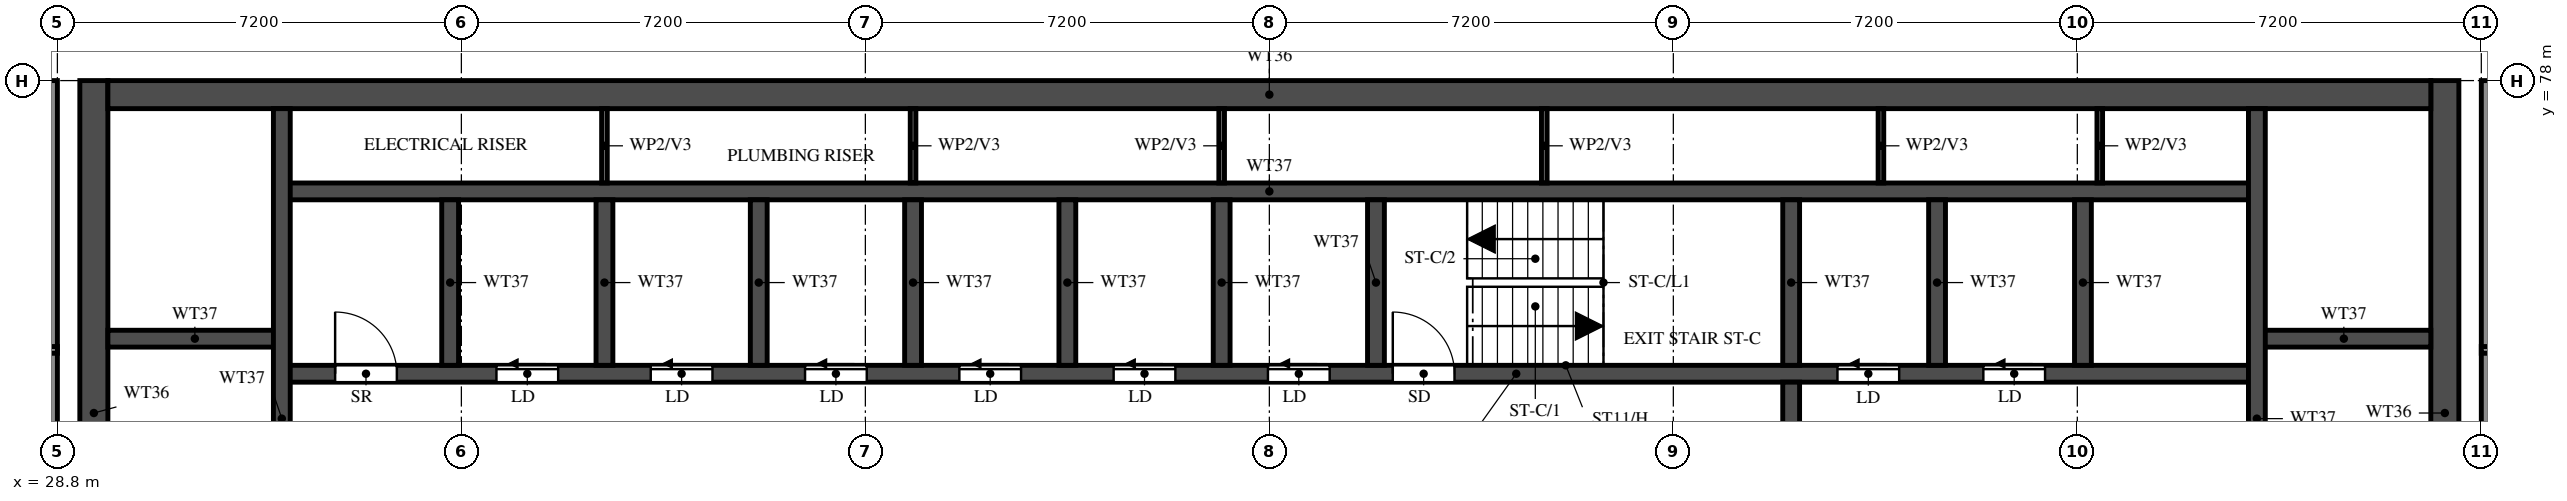
"""IFC4 building model, lengths in metres.
Left out: names, types, materials, properties, quantities, classifications, styles, units other than length and angle.
Written with IfcOpenShell. Run it as: python <this file> out.ifc"""

import sys

from ifc_helpers import new_model, si_unit, direction, frame, frame_2d, origin, place, context, subcontext, project, spatial, rectangle, extrude, element, fill, save


model = new_model("IFC4")
c1 = context("Model", 3, precision=1e-05, world=origin(), true_north=direction((0.0, 1.0)))
c2 = subcontext(c1, "Body", "Model", "MODEL_VIEW")
j1 = project(units=[si_unit("LENGTHUNIT", "METRE"), si_unit("PLANEANGLEUNIT", "RADIAN")], contexts=[c1])
p1 = place(None, origin())
s1 = spatial("IfcSite", under=j1, at=p1, CompositionType="ELEMENT")
p2 = place(p1, origin())
s2 = spatial("IfcBuilding", under=s1, at=p2, CompositionType="ELEMENT")
p3 = place(p2, frame((0.0, 0.0, 264.0)))
s3 = spatial("IfcBuildingStorey", under=s2, at=p3, CompositionType="ELEMENT", Elevation=264.0)
for number, where, z_axis, x_axis in (
    (1, (29.45, 66.15, 0.0), (0.0, 0.0, 1.0), (0.0, 1.0, 0.0)),
    (2, (71.35, 66.15, 0.0), (0.0, 0.0, 1.0), (0.0, 1.0, 0.0)),
):
    element("IfcWall", number, at=place(p3, frame(where, z_axis=z_axis, x_axis=x_axis)), inside=s3, PredefinedType="SHEAR", context=c2, shape_type="SweptSolid", body=[
        extrude(rectangle(XDim=11.85, YDim=0.5, at=frame_2d((5.925, 0.0))), origin(), (0.0, 0.0, 1.0), 3.22),
    ])
p4 = place(p3, frame((29.7, 77.75, 0.0), z_axis=(0.0, 0.0, 1.0), x_axis=(1.0, 0.0, 0.0)))
e3 = element("IfcWall", 3, at=p4, inside=s3, PredefinedType="SHEAR", context=c2, shape_type="SweptSolid", body=[
    extrude(rectangle(XDim=41.4, YDim=0.5, at=frame_2d((20.7, 0.0))), origin(), (0.0, 0.0, 1.0), 3.22),
])
p5 = place(p3, frame((32.8, 72.775, 0.0), z_axis=(0.0, 0.0, 1.0), x_axis=(1.0, 0.0, 0.0)))
e4 = element("IfcWall", 4, at=p5, inside=s3, PredefinedType="SHEAR", context=c2, shape_type="SweptSolid", body=[
    extrude(rectangle(XDim=35.2, YDim=0.3, at=frame_2d((17.6, 0.0))), origin(), (0.0, 0.0, 1.0), 3.22),
])
p6 = place(p5, frame((19.8, 0.0, 0.0)))
e5 = element("IfcOpeningElement", 5, at=p6, cuts=e4, PredefinedType="OPENING", context=c2, shape_type="SweptSolid", body=[
    extrude(rectangle(XDim=1.1, YDim=2.1, at=frame_2d((0.55, 1.05))), frame((0.0, 0.16, 0.0), z_axis=(0.0, -1.0, 0.0), x_axis=(1.0, 0.0, 0.0)), (0.0, 0.0, 1.0), 0.32),
])
p7 = place(p5, frame((27.725, 0.0, 0.0)))
e6 = element("IfcOpeningElement", 6, at=p7, cuts=e4, PredefinedType="OPENING", context=c2, shape_type="SweptSolid", body=[
    extrude(rectangle(XDim=1.1, YDim=2.1, at=frame_2d((0.55, 1.05))), frame((0.0, 0.16, 0.0), z_axis=(0.0, -1.0, 0.0), x_axis=(1.0, 0.0, 0.0)), (0.0, 0.0, 1.0), 0.32),
])
p8 = place(p5, frame((30.325, 0.0, 0.0)))
e7 = element("IfcOpeningElement", 7, at=p8, cuts=e4, PredefinedType="OPENING", context=c2, shape_type="SweptSolid", body=[
    extrude(rectangle(XDim=1.1, YDim=2.1, at=frame_2d((0.55, 1.05))), frame((0.0, 0.16, 0.0), z_axis=(0.0, -1.0, 0.0), x_axis=(1.0, 0.0, 0.0)), (0.0, 0.0, 1.0), 0.32),
])
p9 = place(p5, frame((3.825, 0.0, 0.0)))
e8 = element("IfcOpeningElement", 8, at=p9, cuts=e4, PredefinedType="OPENING", context=c2, shape_type="SweptSolid", body=[
    extrude(rectangle(XDim=1.1, YDim=2.1, at=frame_2d((0.55, 1.05))), frame((0.0, 0.16, 0.0), z_axis=(0.0, -1.0, 0.0), x_axis=(1.0, 0.0, 0.0)), (0.0, 0.0, 1.0), 0.32),
])
p10 = place(p5, frame((6.575, 0.0, 0.0)))
e9 = element("IfcOpeningElement", 9, at=p10, cuts=e4, PredefinedType="OPENING", context=c2, shape_type="SweptSolid", body=[
    extrude(rectangle(XDim=1.1, YDim=2.1, at=frame_2d((0.55, 1.05))), frame((0.0, 0.16, 0.0), z_axis=(0.0, -1.0, 0.0), x_axis=(1.0, 0.0, 0.0)), (0.0, 0.0, 1.0), 0.32),
])
p11 = place(p5, frame((9.325, 0.0, 0.0)))
e10 = element("IfcOpeningElement", 10, at=p11, cuts=e4, PredefinedType="OPENING", context=c2, shape_type="SweptSolid", body=[
    extrude(rectangle(XDim=1.1, YDim=2.1, at=frame_2d((0.55, 1.05))), frame((0.0, 0.16, 0.0), z_axis=(0.0, -1.0, 0.0), x_axis=(1.0, 0.0, 0.0)), (0.0, 0.0, 1.0), 0.32),
])
p12 = place(p5, frame((12.075, 0.0, 0.0)))
e11 = element("IfcOpeningElement", 11, at=p12, cuts=e4, PredefinedType="OPENING", context=c2, shape_type="SweptSolid", body=[
    extrude(rectangle(XDim=1.1, YDim=2.1, at=frame_2d((0.55, 1.05))), frame((0.0, 0.16, 0.0), z_axis=(0.0, -1.0, 0.0), x_axis=(1.0, 0.0, 0.0)), (0.0, 0.0, 1.0), 0.32),
])
p13 = place(p5, frame((14.825, 0.0, 0.0)))
e12 = element("IfcOpeningElement", 12, at=p13, cuts=e4, PredefinedType="OPENING", context=c2, shape_type="SweptSolid", body=[
    extrude(rectangle(XDim=1.1, YDim=2.1, at=frame_2d((0.55, 1.05))), frame((0.0, 0.16, 0.0), z_axis=(0.0, -1.0, 0.0), x_axis=(1.0, 0.0, 0.0)), (0.0, 0.0, 1.0), 0.32),
])
p14 = place(p5, frame((17.575, 0.0, 0.0)))
e13 = element("IfcOpeningElement", 13, at=p14, cuts=e4, PredefinedType="OPENING", context=c2, shape_type="SweptSolid", body=[
    extrude(rectangle(XDim=1.1, YDim=2.1, at=frame_2d((0.55, 1.05))), frame((0.0, 0.16, 0.0), z_axis=(0.0, -1.0, 0.0), x_axis=(1.0, 0.0, 0.0)), (0.0, 0.0, 1.0), 0.32),
])
p15 = place(p5, frame((0.95, 0.0, 0.0)))
e14 = element("IfcOpeningElement", 14, at=p15, cuts=e4, PredefinedType="OPENING", context=c2, shape_type="SweptSolid", body=[
    extrude(rectangle(XDim=1.1, YDim=2.1, at=frame_2d((0.55, 1.05))), frame((0.0, 0.16, 0.0), z_axis=(0.0, -1.0, 0.0), x_axis=(1.0, 0.0, 0.0)), (0.0, 0.0, 1.0), 0.32),
])
p16 = place(p3, frame((32.8, 76.025, 0.0), z_axis=(0.0, 0.0, 1.0), x_axis=(1.0, 0.0, 0.0)))
e15 = element("IfcWall", 15, at=p16, inside=s3, PredefinedType="SHEAR", context=c2, shape_type="SweptSolid", body=[
    extrude(rectangle(XDim=35.2, YDim=0.3, at=frame_2d((17.6, 0.0))), origin(), (0.0, 0.0, 1.0), 3.22),
])
for number, where, z_axis, x_axis in (
    (16, (29.7, 73.4, 0.0), (0.0, 0.0, 1.0), (1.0, 0.0, 0.0)),
    (17, (68.0, 73.4, 0.0), (0.0, 0.0, 1.0), (1.0, 0.0, 0.0)),
):
    element("IfcWall", number, at=place(p3, frame(where, z_axis=z_axis, x_axis=x_axis)), inside=s3, PredefinedType="SHEAR", context=c2, shape_type="SweptSolid", body=[
        extrude(rectangle(XDim=3.1, YDim=0.3, at=frame_2d((1.55, 0.0))), origin(), (0.0, 0.0, 1.0), 3.22),
    ])
p17 = place(p3, frame((32.8, 66.45, 0.0), z_axis=(0.0, 0.0, 1.0), x_axis=(0.0, 1.0, 0.0)))
e18 = element("IfcWall", 18, at=p17, inside=s3, PredefinedType="SHEAR", context=c2, shape_type="SweptSolid", body=[
    extrude(rectangle(XDim=11.05, YDim=0.3, at=frame_2d((5.525, 0.0))), origin(), (0.0, 0.0, 1.0), 3.22),
])
p18 = place(p3, frame((68.0, 66.45, 0.0), z_axis=(0.0, 0.0, 1.0), x_axis=(0.0, 1.0, 0.0)))
e19 = element("IfcWall", 19, at=p18, inside=s3, PredefinedType="SHEAR", context=c2, shape_type="SweptSolid", body=[
    extrude(rectangle(XDim=11.05, YDim=0.3, at=frame_2d((5.525, 0.0))), origin(), (0.0, 0.0, 1.0), 3.22),
])
p19 = place(p18, frame((0.15, 0.0, 0.0)))
e20 = element("IfcOpeningElement", 20, at=p19, cuts=e19, PredefinedType="OPENING", context=c2, shape_type="SweptSolid", body=[
    extrude(rectangle(XDim=1.1, YDim=2.1, at=frame_2d((0.55, 1.05))), frame((0.0, 0.16, 0.0), z_axis=(0.0, -1.0, 0.0), x_axis=(1.0, 0.0, 0.0)), (0.0, 0.0, 1.0), 0.32),
])
p20 = place(p3, frame((59.7, 66.45, 0.0), z_axis=(0.0, 0.0, 1.0), x_axis=(0.0, 1.0, 0.0)))
e21 = element("IfcWall", 21, at=p20, inside=s3, PredefinedType="SHEAR", context=c2, shape_type="SweptSolid", body=[
    extrude(rectangle(XDim=6.175, YDim=0.3, at=frame_2d((3.087, 0.0))), origin(), (0.0, 0.0, 1.0), 3.22),
])
p21 = place(p20, frame((3.85, 0.0, 0.0)))
e22 = element("IfcOpeningElement", 22, at=p21, cuts=e21, PredefinedType="OPENING", context=c2, shape_type="SweptSolid", body=[
    extrude(rectangle(XDim=1.2, YDim=2.1, at=frame_2d((0.6, 1.05))), frame((0.0, 0.16, 0.0), z_axis=(0.0, -1.0, 0.0), x_axis=(1.0, 0.0, 0.0)), (0.0, 0.0, 1.0), 0.32),
])
for number, where, z_axis, x_axis in (
    (23, (59.7, 72.925, 0.0), (0.0, 0.0, 1.0), (0.0, 1.0, 0.0)),
    (24, (35.8, 72.925, 0.0), (0.0, 0.0, 1.0), (0.0, 1.0, 0.0)),
    (25, (38.55, 72.925, 0.0), (0.0, 0.0, 1.0), (0.0, 1.0, 0.0)),
    (26, (41.3, 72.925, 0.0), (0.0, 0.0, 1.0), (0.0, 1.0, 0.0)),
    (27, (44.05, 72.925, 0.0), (0.0, 0.0, 1.0), (0.0, 1.0, 0.0)),
    (28, (46.8, 72.925, 0.0), (0.0, 0.0, 1.0), (0.0, 1.0, 0.0)),
    (29, (49.55, 72.925, 0.0), (0.0, 0.0, 1.0), (0.0, 1.0, 0.0)),
    (30, (52.3, 72.925, 0.0), (0.0, 0.0, 1.0), (0.0, 1.0, 0.0)),
    (31, (62.3, 72.925, 0.0), (0.0, 0.0, 1.0), (0.0, 1.0, 0.0)),
    (32, (64.9, 72.925, 0.0), (0.0, 0.0, 1.0), (0.0, 1.0, 0.0)),
):
    element("IfcWall", number, at=place(p3, frame(where, z_axis=z_axis, x_axis=x_axis)), inside=s3, PredefinedType="SHEAR", context=c2, shape_type="SweptSolid", body=[
        extrude(rectangle(XDim=2.95, YDim=0.3, at=frame_2d((1.475, 0.0))), origin(), (0.0, 0.0, 1.0), 3.22),
    ])
for number, where, z_axis, x_axis in (
    (33, (38.55, 76.175, 0.0), (0.0, 0.0, 1.0), (0.0, 1.0, 0.0)),
    (34, (44.05, 76.175, 0.0), (0.0, 0.0, 1.0), (0.0, 1.0, 0.0)),
    (35, (49.55, 76.175, 0.0), (0.0, 0.0, 1.0), (0.0, 1.0, 0.0)),
    (36, (55.3, 76.175, 0.0), (0.0, 0.0, 1.0), (0.0, 1.0, 0.0)),
    (37, (61.3, 76.175, 0.0), (0.0, 0.0, 1.0), (0.0, 1.0, 0.0)),
    (38, (65.2, 76.175, 0.0), (0.0, 0.0, 1.0), (0.0, 1.0, 0.0)),
):
    element("IfcWall", number, at=place(p3, frame(where, z_axis=z_axis, x_axis=x_axis)), inside=s3, PredefinedType="PARTITIONING", context=c2, shape_type="SweptSolid", body=[
        extrude(rectangle(XDim=1.325, YDim=0.1, at=frame_2d((0.663, 0.0))), origin(), (0.0, 0.0, 1.0), 3.22),
    ])
for number, where, z_axis, x_axis in (
    (39, (28.7, 62.4, 0.0), (0.0, 0.0, 1.0), (0.0, 1.0, 0.0)),
    (40, (72.1, 62.4, 0.0), (0.0, 0.0, 1.0), (0.0, 1.0, 0.0)),
):
    element("IfcWall", number, at=place(p3, frame(where, z_axis=z_axis, x_axis=x_axis)), inside=s3, PredefinedType="SOLIDWALL", context=c2, shape_type="SweptSolid", body=[
        extrude(rectangle(XDim=15.6, YDim=0.2, at=frame_2d((7.8, 0.0))), origin(), (0.0, 0.0, 1.0), 3.22),
    ])
p22 = place(p3, frame((18.525, 73.2, 0.0), z_axis=(0.0, 0.0, 1.0), x_axis=(1.0, 0.0, 0.0)))
e41 = element("IfcWall", 41, at=p22, inside=s3, PredefinedType="PARTITIONING", context=c2, shape_type="SweptSolid", body=[
    extrude(rectangle(XDim=10.275, YDim=0.12, at=frame_2d((5.138, 0.0))), origin(), (0.0, 0.0, 1.0), 2.32),
])
p23 = place(p22, frame((5.275, 0.0, 0.0)))
e42 = element("IfcOpeningElement", 42, at=p23, cuts=e41, PredefinedType="OPENING", context=c2, shape_type="SweptSolid", body=[
    extrude(rectangle(XDim=0.9, YDim=2.1, at=frame_2d((0.45, 1.05))), frame((0.0, 0.07, 0.0), z_axis=(0.0, -1.0, 0.0), x_axis=(1.0, 0.0, 0.0)), (0.0, 0.0, 1.0), 0.14),
])
p24 = place(p3, frame((72.0, 73.2, 0.0), z_axis=(0.0, 0.0, 1.0), x_axis=(1.0, 0.0, 0.0)))
e43 = element("IfcWall", 43, at=p24, inside=s3, PredefinedType="PARTITIONING", context=c2, shape_type="SweptSolid", body=[
    extrude(rectangle(XDim=10.275, YDim=0.12, at=frame_2d((5.137, 0.0))), origin(), (0.0, 0.0, 1.0), 2.32),
])
p25 = place(p24, frame((4.1, 0.0, 0.0)))
e44 = element("IfcOpeningElement", 44, at=p25, cuts=e43, PredefinedType="OPENING", context=c2, shape_type="SweptSolid", body=[
    extrude(rectangle(XDim=0.9, YDim=2.1, at=frame_2d((0.45, 1.05))), frame((0.0, 0.07, 0.0), z_axis=(0.0, -1.0, 0.0), x_axis=(1.0, 0.0, 0.0)), (0.0, 0.0, 1.0), 0.14),
])
p26 = place(p6, origin())
e45 = element("IfcDoor", 45, at=p26, inside=s3, OperationType="SINGLE_SWING_LEFT", PredefinedType="DOOR", context=c2, shape_type="SweptSolid", body=[
    extrude(rectangle(XDim=1.1, YDim=2.1, at=frame_2d((0.55, 1.05))), frame((0.0, 0.025, 0.0), z_axis=(0.0, -1.0, 0.0), x_axis=(1.0, 0.0, 0.0)), (0.0, 0.0, 1.0), 0.05),
])
fill(e5, e45)
p27 = place(p7, origin())
e46 = element("IfcDoor", 46, at=p27, inside=s3, OperationType="SLIDING_TO_LEFT", PredefinedType="DOOR", context=c2, shape_type="SweptSolid", body=[
    extrude(rectangle(XDim=1.1, YDim=2.1, at=frame_2d((0.55, 1.05))), frame((0.0, 0.025, 0.0), z_axis=(0.0, -1.0, 0.0), x_axis=(1.0, 0.0, 0.0)), (0.0, 0.0, 1.0), 0.05),
])
fill(e6, e46)
p28 = place(p8, origin())
e47 = element("IfcDoor", 47, at=p28, inside=s3, OperationType="SLIDING_TO_LEFT", PredefinedType="DOOR", context=c2, shape_type="SweptSolid", body=[
    extrude(rectangle(XDim=1.1, YDim=2.1, at=frame_2d((0.55, 1.05))), frame((0.0, 0.025, 0.0), z_axis=(0.0, -1.0, 0.0), x_axis=(1.0, 0.0, 0.0)), (0.0, 0.0, 1.0), 0.05),
])
fill(e7, e47)
p29 = place(p9, origin())
e48 = element("IfcDoor", 48, at=p29, inside=s3, OperationType="SLIDING_TO_LEFT", PredefinedType="DOOR", context=c2, shape_type="SweptSolid", body=[
    extrude(rectangle(XDim=1.1, YDim=2.1, at=frame_2d((0.55, 1.05))), frame((0.0, 0.025, 0.0), z_axis=(0.0, -1.0, 0.0), x_axis=(1.0, 0.0, 0.0)), (0.0, 0.0, 1.0), 0.05),
])
fill(e8, e48)
p30 = place(p10, origin())
e49 = element("IfcDoor", 49, at=p30, inside=s3, OperationType="SLIDING_TO_LEFT", PredefinedType="DOOR", context=c2, shape_type="SweptSolid", body=[
    extrude(rectangle(XDim=1.1, YDim=2.1, at=frame_2d((0.55, 1.05))), frame((0.0, 0.025, 0.0), z_axis=(0.0, -1.0, 0.0), x_axis=(1.0, 0.0, 0.0)), (0.0, 0.0, 1.0), 0.05),
])
fill(e9, e49)
p31 = place(p11, origin())
e50 = element("IfcDoor", 50, at=p31, inside=s3, OperationType="SLIDING_TO_LEFT", PredefinedType="DOOR", context=c2, shape_type="SweptSolid", body=[
    extrude(rectangle(XDim=1.1, YDim=2.1, at=frame_2d((0.55, 1.05))), frame((0.0, 0.025, 0.0), z_axis=(0.0, -1.0, 0.0), x_axis=(1.0, 0.0, 0.0)), (0.0, 0.0, 1.0), 0.05),
])
fill(e10, e50)
p32 = place(p12, origin())
e51 = element("IfcDoor", 51, at=p32, inside=s3, OperationType="SLIDING_TO_LEFT", PredefinedType="DOOR", context=c2, shape_type="SweptSolid", body=[
    extrude(rectangle(XDim=1.1, YDim=2.1, at=frame_2d((0.55, 1.05))), frame((0.0, 0.025, 0.0), z_axis=(0.0, -1.0, 0.0), x_axis=(1.0, 0.0, 0.0)), (0.0, 0.0, 1.0), 0.05),
])
fill(e11, e51)
p33 = place(p13, origin())
e52 = element("IfcDoor", 52, at=p33, inside=s3, OperationType="SLIDING_TO_LEFT", PredefinedType="DOOR", context=c2, shape_type="SweptSolid", body=[
    extrude(rectangle(XDim=1.1, YDim=2.1, at=frame_2d((0.55, 1.05))), frame((0.0, 0.025, 0.0), z_axis=(0.0, -1.0, 0.0), x_axis=(1.0, 0.0, 0.0)), (0.0, 0.0, 1.0), 0.05),
])
fill(e12, e52)
p34 = place(p14, origin())
e53 = element("IfcDoor", 53, at=p34, inside=s3, OperationType="SLIDING_TO_LEFT", PredefinedType="DOOR", context=c2, shape_type="SweptSolid", body=[
    extrude(rectangle(XDim=1.1, YDim=2.1, at=frame_2d((0.55, 1.05))), frame((0.0, 0.025, 0.0), z_axis=(0.0, -1.0, 0.0), x_axis=(1.0, 0.0, 0.0)), (0.0, 0.0, 1.0), 0.05),
])
fill(e13, e53)
p35 = place(p15, origin())
e54 = element("IfcDoor", 54, at=p35, inside=s3, OperationType="SINGLE_SWING_LEFT", PredefinedType="DOOR", context=c2, shape_type="SweptSolid", body=[
    extrude(rectangle(XDim=1.1, YDim=2.1, at=frame_2d((0.55, 1.05))), frame((0.0, 0.025, 0.0), z_axis=(0.0, -1.0, 0.0), x_axis=(1.0, 0.0, 0.0)), (0.0, 0.0, 1.0), 0.05),
])
fill(e14, e54)
save(model, sys.argv[1])
